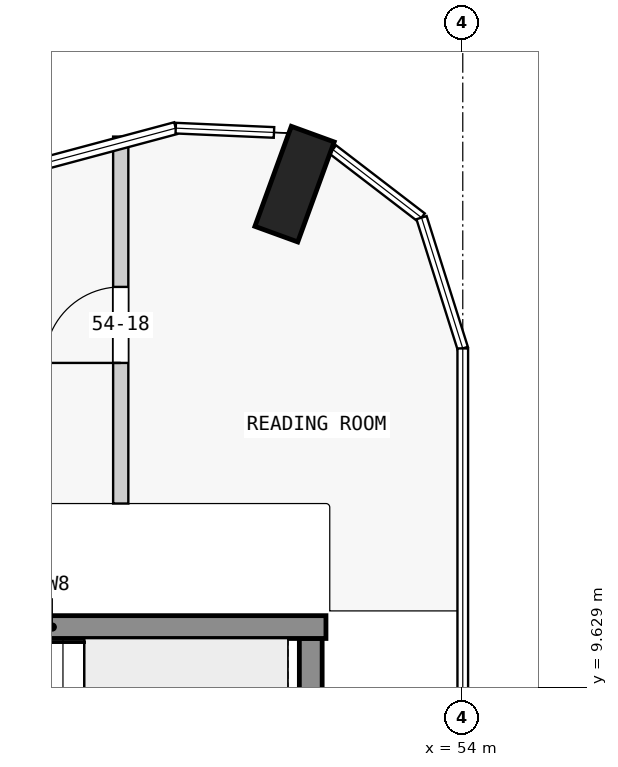
"""IFC4 building model, lengths in metres.
Left out: names, types, materials, properties, quantities, classifications, styles, units other than length and angle.
Written with IfcOpenShell. Run it as: python <this file> out.ifc"""

import sys

from ifc_helpers import new_model, si_unit, direction, frame, frame_2d, origin, origin_2d, place, context, subcontext, project, spatial, rectangle, extrude, element, fill, save


model = new_model("IFC4")
c1 = context("Model", 3, precision=1e-05, world=origin(), true_north=direction((0.0, 1.0)))
c2 = subcontext(c1, "Body", "Model", "MODEL_VIEW")
j1 = project(units=[si_unit("LENGTHUNIT", "METRE"), si_unit("PLANEANGLEUNIT", "RADIAN")], contexts=[c1])
p1 = place(None, origin())
s1 = spatial("IfcSite", under=j1, at=p1, CompositionType="ELEMENT")
p2 = place(p1, origin())
s2 = spatial("IfcBuilding", under=s1, at=p2, CompositionType="ELEMENT")
p3 = place(p2, frame((0.0, 0.0, 208.4)))
s3 = spatial("IfcBuildingStorey", under=s2, at=p3, CompositionType="ELEMENT", Elevation=208.4)
p4 = place(p3, frame((51.787, 16.252, 0.0), z_axis=(0.0, 0.0, 1.0), x_axis=(-0.939664280925, 0.342097996418, 0.0)))
e1 = element("IfcColumn", 1, at=p4, inside=s3, PredefinedType="COLUMN", context=c2, shape_type="SweptSolid", body=[
    extrude(rectangle(XDim=0.6, YDim=1.4, at=origin_2d()), origin(), (0.0, 0.0, 1.0), 3.5),
])
p5 = place(p3, frame((52.0, 7.725, 0.0), z_axis=(0.0, 0.0, 1.0), x_axis=(0.0, 1.0, 0.0)))
e2 = element("IfcWall", 2, at=p5, inside=s3, PredefinedType="SHEAR", context=c2, shape_type="SweptSolid", body=[
    extrude(rectangle(XDim=2.55, YDim=0.3, at=frame_2d((1.275, 0.0))), origin(), (0.0, 0.0, 1.0), 3.5),
])
p6 = place(p3, frame((45.0, 10.425, 0.0), z_axis=(0.0, 0.0, 1.0), x_axis=(1.0, 0.0, 0.0)))
e3 = element("IfcWall", 3, at=p6, inside=s3, PredefinedType="SHEAR", context=c2, shape_type="SweptSolid", body=[
    extrude(rectangle(XDim=7.2, YDim=0.3, at=frame_2d((3.6, 0.0))), origin(), (0.0, 0.0, 1.0), 3.5),
])
p7 = place(p3, frame((49.5, 12.05, 0.0), z_axis=(0.0, 0.0, 1.0), x_axis=(0.0, 1.0, 0.0)))
e4 = element("IfcWall", 4, at=p7, inside=s3, PredefinedType="PARTITIONING", context=c2, shape_type="SweptSolid", body=[
    extrude(rectangle(XDim=4.828, YDim=0.2, at=frame_2d((2.414, 0.0))), origin(), (0.0, 0.0, 1.0), 3.25),
])
p8 = place(p7, frame((1.85, 0.0, 0.0)))
e5 = element("IfcOpeningElement", 5, at=p8, cuts=e4, PredefinedType="OPENING", context=c2, shape_type="SweptSolid", body=[
    extrude(rectangle(XDim=1.0, YDim=2.1, at=frame_2d((0.5, 1.05))), frame((0.0, 0.11, 0.0), z_axis=(0.0, -1.0, 0.0), x_axis=(1.0, 0.0, 0.0)), (0.0, 0.0, 1.0), 0.22),
])
p9 = place(p8, origin())
e6 = element("IfcDoor", 6, at=p9, inside=s3, OperationType="SINGLE_SWING_LEFT", PredefinedType="DOOR", context=c2, shape_type="SweptSolid", body=[
    extrude(rectangle(XDim=1.0, YDim=2.1, at=frame_2d((0.5, 1.05))), frame((0.0, 0.025, 0.0), z_axis=(0.0, -1.0, 0.0), x_axis=(1.0, 0.0, 0.0)), (0.0, 0.0, 1.0), 0.05),
])
fill(e5, e6)
save(model, sys.argv[1])
